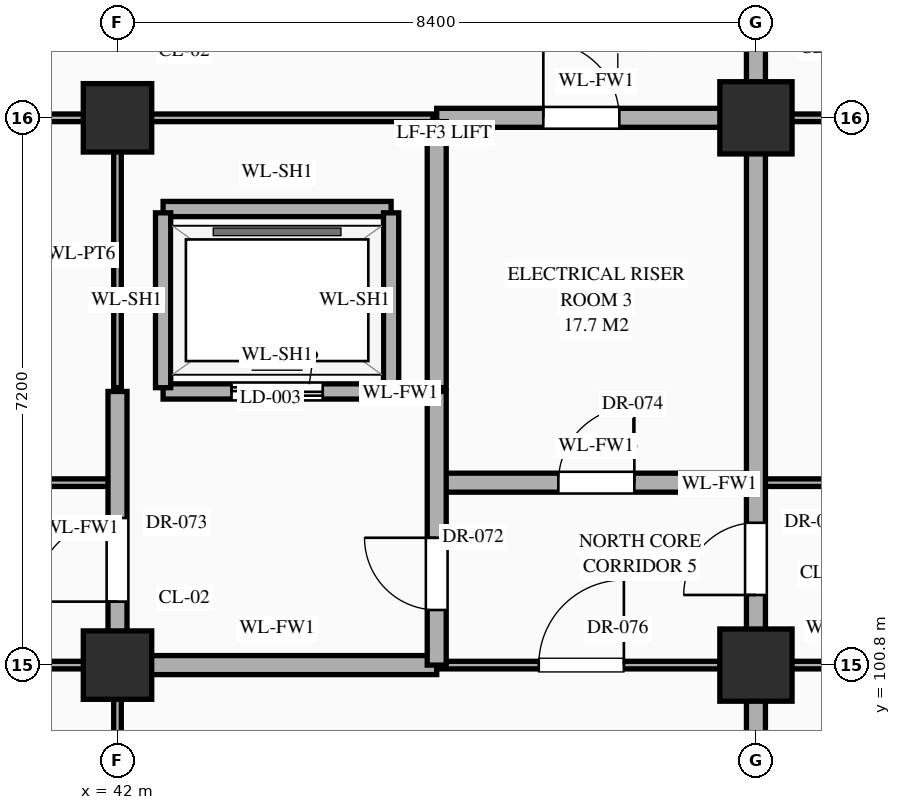
"""IFC4 building model, lengths in metres.
Left out: names, types, materials, properties, quantities, classifications, styles, units other than length and angle.
Written with IfcOpenShell. Run it as: python <this file> out.ifc"""

import sys

from ifc_helpers import new_model, si_unit, direction, frame, frame_2d, origin, origin_2d, place, context, subcontext, project, spatial, rectangle, extrude, element, fill, save


model = new_model("IFC4")
c1 = context("Model", 3, precision=1e-05, world=origin(), true_north=direction((0.0, 1.0)))
c2 = subcontext(c1, "Body", "Model", "MODEL_VIEW")
j1 = project(units=[si_unit("LENGTHUNIT", "METRE"), si_unit("PLANEANGLEUNIT", "RADIAN")], contexts=[c1])
p1 = place(None, origin())
s1 = spatial("IfcSite", under=j1, at=p1, CompositionType="ELEMENT")
p2 = place(p1, origin())
s2 = spatial("IfcBuilding", under=s1, at=p2, CompositionType="ELEMENT")
p3 = place(p2, frame((0.0, 0.0, -10.2)))
s3 = spatial("IfcBuildingStorey", under=s2, at=p3, CompositionType="ELEMENT", Elevation=-10.2)
for number, where, z_axis, x_axis in (
    (1, (42.0, 100.8, 0.0), (0.0, 0.0, 1.0), (1.0, 0.0, 0.0)),
    (2, (42.0, 108.0, 0.0), (0.0, 0.0, 1.0), (1.0, 0.0, 0.0)),
):
    element("IfcColumn", number, at=place(p3, frame(where, z_axis=z_axis, x_axis=x_axis)), inside=s3, PredefinedType="COLUMN", context=c2, shape_type="SweptSolid", body=[
        extrude(rectangle(XDim=0.9, YDim=0.9, at=origin_2d()), origin(), (0.0, 0.0, 1.0), 4.8),
    ])
for number, where, z_axis, x_axis in (
    (3, (50.4, 100.8, 0.0), (0.0, 0.0, 1.0), (1.0, 0.0, 0.0)),
    (4, (50.4, 108.0, 0.0), (0.0, 0.0, 1.0), (1.0, 0.0, 0.0)),
):
    element("IfcColumn", number, at=place(p3, frame(where, z_axis=z_axis, x_axis=x_axis)), inside=s3, PredefinedType="COLUMN", context=c2, shape_type="SweptSolid", body=[
        extrude(rectangle(XDim=0.95, YDim=0.95, at=origin_2d()), origin(), (0.0, 0.0, 1.0), 4.8),
    ])
p4 = place(p3, frame((0.04, 100.8, 0.0), z_axis=(0.0, 0.0, 1.0), x_axis=(1.0, 0.0, 0.0)))
e5 = element("IfcWall", 5, at=p4, inside=s3, PredefinedType="STANDARD", context=c2, shape_type="SweptSolid", body=[
    extrude(rectangle(XDim=41.96, YDim=0.1, at=frame_2d((20.98, 0.0))), origin(), (0.0, 0.0, 1.0), 3.63),
])
p5 = place(p4, frame((1.353, 0.0, 0.0)))
e6 = element("IfcOpeningElement", 6, at=p5, cuts=e5, PredefinedType="OPENING", context=c2, shape_type="SweptSolid", body=[
    extrude(rectangle(XDim=0.96, YDim=2.2, at=frame_2d((0.48, 1.1))), frame((0.0, 0.062, 0.0), z_axis=(0.0, -1.0, 0.0), x_axis=(1.0, 0.0, 0.0)), (0.0, 0.0, 1.0), 0.124),
])
p6 = place(p4, frame((4.06, 0.0, 0.0)))
e7 = element("IfcOpeningElement", 7, at=p6, cuts=e5, PredefinedType="OPENING", context=c2, shape_type="SweptSolid", body=[
    extrude(rectangle(XDim=1.0, YDim=2.25, at=frame_2d((0.5, 1.125))), frame((0.0, 0.062, 0.0), z_axis=(0.0, -1.0, 0.0), x_axis=(1.0, 0.0, 0.0)), (0.0, 0.0, 1.0), 0.124),
])
p7 = place(p4, frame((6.367, 0.0, 0.0)))
e8 = element("IfcOpeningElement", 8, at=p7, cuts=e5, PredefinedType="OPENING", context=c2, shape_type="SweptSolid", body=[
    extrude(rectangle(XDim=1.04, YDim=2.2, at=frame_2d((0.52, 1.1))), frame((0.0, 0.062, 0.0), z_axis=(0.0, -1.0, 0.0), x_axis=(1.0, 0.0, 0.0)), (0.0, 0.0, 1.0), 0.124),
])
p8 = place(p4, frame((12.02, 0.0, 0.0)))
e9 = element("IfcOpeningElement", 9, at=p8, cuts=e5, PredefinedType="OPENING", context=c2, shape_type="SweptSolid", body=[
    extrude(rectangle(XDim=1.08, YDim=2.25, at=frame_2d((0.54, 1.125))), frame((0.0, 0.062, 0.0), z_axis=(0.0, -1.0, 0.0), x_axis=(1.0, 0.0, 0.0)), (0.0, 0.0, 1.0), 0.124),
])
p9 = place(p4, frame((20.387, 0.0, 0.0)))
e10 = element("IfcOpeningElement", 10, at=p9, cuts=e5, PredefinedType="OPENING", context=c2, shape_type="SweptSolid", body=[
    extrude(rectangle(XDim=1.12, YDim=2.25, at=frame_2d((0.56, 1.125))), frame((0.0, 0.062, 0.0), z_axis=(0.0, -1.0, 0.0), x_axis=(1.0, 0.0, 0.0)), (0.0, 0.0, 1.0), 0.124),
])
p10 = place(p4, frame((26.465, 0.0, 0.0)))
e11 = element("IfcOpeningElement", 11, at=p10, cuts=e5, PredefinedType="OPENING", context=c2, shape_type="SweptSolid", body=[
    extrude(rectangle(XDim=1.16, YDim=2.3, at=frame_2d((0.58, 1.15))), frame((0.0, 0.062, 0.0), z_axis=(0.0, -1.0, 0.0), x_axis=(1.0, 0.0, 0.0)), (0.0, 0.0, 1.0), 0.124),
])
p11 = place(p4, frame((29.16, 0.0, 0.0)))
e12 = element("IfcOpeningElement", 12, at=p11, cuts=e5, PredefinedType="OPENING", context=c2, shape_type="SweptSolid", body=[
    extrude(rectangle(XDim=1.2, YDim=2.35, at=frame_2d((0.6, 1.175))), frame((0.0, 0.062, 0.0), z_axis=(0.0, -1.0, 0.0), x_axis=(1.0, 0.0, 0.0)), (0.0, 0.0, 1.0), 0.124),
])
p12 = place(p4, frame((31.455, 0.0, 0.0)))
e13 = element("IfcOpeningElement", 13, at=p12, cuts=e5, PredefinedType="OPENING", context=c2, shape_type="SweptSolid", body=[
    extrude(rectangle(XDim=1.24, YDim=2.3, at=frame_2d((0.62, 1.15))), frame((0.0, 0.062, 0.0), z_axis=(0.0, -1.0, 0.0), x_axis=(1.0, 0.0, 0.0)), (0.0, 0.0, 1.0), 0.124),
])
p13 = place(p4, frame((37.12, 0.0, 0.0)))
e14 = element("IfcOpeningElement", 14, at=p13, cuts=e5, PredefinedType="OPENING", context=c2, shape_type="SweptSolid", body=[
    extrude(rectangle(XDim=1.28, YDim=2.35, at=frame_2d((0.64, 1.175))), frame((0.0, 0.062, 0.0), z_axis=(0.0, -1.0, 0.0), x_axis=(1.0, 0.0, 0.0)), (0.0, 0.0, 1.0), 0.124),
])
p14 = place(p3, frame((42.0, 100.8, 0.0), z_axis=(0.0, 0.0, 1.0), x_axis=(1.0, 0.0, 0.0)))
e15 = element("IfcWall", 15, at=p14, inside=s3, PredefinedType="STANDARD", context=c2, shape_type="SweptSolid", body=[
    extrude(rectangle(XDim=4.2, YDim=0.25, at=frame_2d((2.1, 0.0))), origin(), (0.0, 0.0, 1.0), 3.63),
])
p15 = place(p3, frame((46.2, 100.8, 0.0), z_axis=(0.0, 0.0, 1.0), x_axis=(1.0, 0.0, 0.0)))
e16 = element("IfcWall", 16, at=p15, inside=s3, PredefinedType="STANDARD", context=c2, shape_type="SweptSolid", body=[
    extrude(rectangle(XDim=12.6, YDim=0.1, at=frame_2d((6.3, 0.0))), origin(), (0.0, 0.0, 1.0), 3.63),
])
p16 = place(p15, frame((1.343, 0.0, 0.0)))
e17 = element("IfcOpeningElement", 17, at=p16, cuts=e16, PredefinedType="OPENING", context=c2, shape_type="SweptSolid", body=[
    extrude(rectangle(XDim=1.12, YDim=2.25, at=frame_2d((0.56, 1.125))), frame((0.0, 0.062, 0.0), z_axis=(0.0, -1.0, 0.0), x_axis=(1.0, 0.0, 0.0)), (0.0, 0.0, 1.0), 0.124),
])
p17 = place(p15, frame((5.667, 0.0, 0.0)))
e18 = element("IfcOpeningElement", 18, at=p17, cuts=e16, PredefinedType="OPENING", context=c2, shape_type="SweptSolid", body=[
    extrude(rectangle(XDim=0.86, YDim=2.1, at=frame_2d((0.43, 1.05))), frame((0.0, 0.062, 0.0), z_axis=(0.0, -1.0, 0.0), x_axis=(1.0, 0.0, 0.0)), (0.0, 0.0, 1.0), 0.124),
])
p18 = place(p15, frame((8.34, 0.0, 0.0)))
e19 = element("IfcOpeningElement", 19, at=p18, cuts=e16, PredefinedType="OPENING", context=c2, shape_type="SweptSolid", body=[
    extrude(rectangle(XDim=0.92, YDim=2.15, at=frame_2d((0.46, 1.075))), frame((0.0, 0.062, 0.0), z_axis=(0.0, -1.0, 0.0), x_axis=(1.0, 0.0, 0.0)), (0.0, 0.0, 1.0), 0.124),
])
p19 = place(p15, frame((10.623, 0.0, 0.0)))
e20 = element("IfcOpeningElement", 20, at=p19, cuts=e16, PredefinedType="OPENING", context=c2, shape_type="SweptSolid", body=[
    extrude(rectangle(XDim=0.96, YDim=2.2, at=frame_2d((0.48, 1.1))), frame((0.0, 0.062, 0.0), z_axis=(0.0, -1.0, 0.0), x_axis=(1.0, 0.0, 0.0)), (0.0, 0.0, 1.0), 0.124),
])
p20 = place(p3, frame((0.04, 103.2, 0.0), z_axis=(0.0, 0.0, 1.0), x_axis=(1.0, 0.0, 0.0)))
e21 = element("IfcWall", 21, at=p20, inside=s3, PredefinedType="STANDARD", context=c2, shape_type="SweptSolid", body=[
    extrude(rectangle(XDim=41.96, YDim=0.1, at=frame_2d((20.98, 0.0))), origin(), (0.0, 0.0, 1.0), 4.48),
])
p21 = place(p20, frame((3.65, 0.0, 0.0)))
e22 = element("IfcOpeningElement", 22, at=p21, cuts=e21, PredefinedType="OPENING", context=c2, shape_type="SweptSolid", body=[
    extrude(rectangle(XDim=1.06, YDim=2.4, at=frame_2d((0.53, 1.2))), frame((0.0, 0.062, 0.0), z_axis=(0.0, -1.0, 0.0), x_axis=(1.0, 0.0, 0.0)), (0.0, 0.0, 1.0), 0.124),
])
p22 = place(p20, frame((11.99, 0.0, 0.0)))
e23 = element("IfcOpeningElement", 23, at=p22, cuts=e21, PredefinedType="OPENING", context=c2, shape_type="SweptSolid", body=[
    extrude(rectangle(XDim=1.14, YDim=2.4, at=frame_2d((0.57, 1.2))), frame((0.0, 0.062, 0.0), z_axis=(0.0, -1.0, 0.0), x_axis=(1.0, 0.0, 0.0)), (0.0, 0.0, 1.0), 0.124),
])
p23 = place(p20, frame((20.51, 0.0, 0.0)))
e24 = element("IfcOpeningElement", 24, at=p23, cuts=e21, PredefinedType="OPENING", context=c2, shape_type="SweptSolid", body=[
    extrude(rectangle(XDim=0.9, YDim=2.15, at=frame_2d((0.45, 1.075))), frame((0.0, 0.062, 0.0), z_axis=(0.0, -1.0, 0.0), x_axis=(1.0, 0.0, 0.0)), (0.0, 0.0, 1.0), 0.124),
])
p24 = place(p20, frame((28.93, 0.0, 0.0)))
e25 = element("IfcOpeningElement", 25, at=p24, cuts=e21, PredefinedType="OPENING", context=c2, shape_type="SweptSolid", body=[
    extrude(rectangle(XDim=0.86, YDim=2.1, at=frame_2d((0.43, 1.05))), frame((0.0, 0.062, 0.0), z_axis=(0.0, -1.0, 0.0), x_axis=(1.0, 0.0, 0.0)), (0.0, 0.0, 1.0), 0.124),
])
p25 = place(p20, frame((37.3, 0.0, 0.0)))
e26 = element("IfcOpeningElement", 26, at=p25, cuts=e21, PredefinedType="OPENING", context=c2, shape_type="SweptSolid", body=[
    extrude(rectangle(XDim=0.92, YDim=2.15, at=frame_2d((0.46, 1.075))), frame((0.0, 0.062, 0.0), z_axis=(0.0, -1.0, 0.0), x_axis=(1.0, 0.0, 0.0)), (0.0, 0.0, 1.0), 0.124),
])
p26 = place(p3, frame((46.2, 103.2, 0.0), z_axis=(0.0, 0.0, 1.0), x_axis=(1.0, 0.0, 0.0)))
e27 = element("IfcWall", 27, at=p26, inside=s3, PredefinedType="STANDARD", context=c2, shape_type="SweptSolid", body=[
    extrude(rectangle(XDim=4.2, YDim=0.25, at=frame_2d((2.1, 0.0))), origin(), (0.0, 0.0, 1.0), 4.48),
])
p27 = place(p26, frame((1.6, 0.0, 0.0)))
e28 = element("IfcOpeningElement", 28, at=p27, cuts=e27, PredefinedType="OPENING", context=c2, shape_type="SweptSolid", body=[
    extrude(rectangle(XDim=1.0, YDim=2.2, at=frame_2d((0.5, 1.1))), frame((0.0, 0.137, 0.0), z_axis=(0.0, -1.0, 0.0), x_axis=(1.0, 0.0, 0.0)), (0.0, 0.0, 1.0), 0.274),
])
p28 = place(p3, frame((50.4, 103.2, 0.0), z_axis=(0.0, 0.0, 1.0), x_axis=(1.0, 0.0, 0.0)))
e29 = element("IfcWall", 29, at=p28, inside=s3, PredefinedType="STANDARD", context=c2, shape_type="SweptSolid", body=[
    extrude(rectangle(XDim=8.4, YDim=0.1, at=frame_2d((4.2, 0.0))), origin(), (0.0, 0.0, 1.0), 4.48),
])
p29 = place(p28, frame((3.75, 0.0, 0.0)))
e30 = element("IfcOpeningElement", 30, at=p29, cuts=e29, PredefinedType="OPENING", context=c2, shape_type="SweptSolid", body=[
    extrude(rectangle(XDim=0.9, YDim=2.15, at=frame_2d((0.45, 1.075))), frame((0.0, 0.062, 0.0), z_axis=(0.0, -1.0, 0.0), x_axis=(1.0, 0.0, 0.0)), (0.0, 0.0, 1.0), 0.124),
])
p30 = place(p3, frame((42.6, 104.4, 0.0), z_axis=(0.0, 0.0, 1.0), x_axis=(1.0, 0.0, 0.0)))
e31 = element("IfcWall", 31, at=p30, inside=s3, PredefinedType="STANDARD", context=c2, shape_type="SweptSolid", body=[
    extrude(rectangle(XDim=3.0, YDim=0.2, at=frame_2d((1.5, 0.0))), origin(), (0.0, 0.0, 1.0), 4.48),
])
p31 = place(p30, frame((0.9, 0.0, 0.0)))
e32 = element("IfcOpeningElement", 32, at=p31, cuts=e31, PredefinedType="OPENING", context=c2, shape_type="SweptSolid", body=[
    extrude(rectangle(XDim=1.2, YDim=2.15, at=frame_2d((0.6, 1.075))), frame((0.0, 0.112, 0.0), z_axis=(0.0, -1.0, 0.0), x_axis=(1.0, 0.0, 0.0)), (0.0, 0.0, 1.0), 0.224),
])
p32 = place(p3, frame((42.6, 106.8, 0.0), z_axis=(0.0, 0.0, 1.0), x_axis=(1.0, 0.0, 0.0)))
e33 = element("IfcWall", 33, at=p32, inside=s3, PredefinedType="STANDARD", context=c2, shape_type="SweptSolid", body=[
    extrude(rectangle(XDim=3.0, YDim=0.2, at=frame_2d((1.5, 0.0))), origin(), (0.0, 0.0, 1.0), 4.48),
])
p33 = place(p3, frame((0.04, 108.0, 0.0), z_axis=(0.0, 0.0, 1.0), x_axis=(1.0, 0.0, 0.0)))
e34 = element("IfcWall", 34, at=p33, inside=s3, PredefinedType="STANDARD", context=c2, shape_type="SweptSolid", body=[
    extrude(rectangle(XDim=41.96, YDim=0.1, at=frame_2d((20.98, 0.0))), origin(), (0.0, 0.0, 1.0), 3.63),
])
p34 = place(p33, frame((3.69, 0.0, 0.0)))
e35 = element("IfcOpeningElement", 35, at=p34, cuts=e34, PredefinedType="OPENING", context=c2, shape_type="SweptSolid", body=[
    extrude(rectangle(XDim=0.94, YDim=2.3, at=frame_2d((0.47, 1.15))), frame((0.0, 0.062, 0.0), z_axis=(0.0, -1.0, 0.0), x_axis=(1.0, 0.0, 0.0)), (0.0, 0.0, 1.0), 0.124),
])
p35 = place(p33, frame((12.07, 0.0, 0.0)))
e36 = element("IfcOpeningElement", 36, at=p35, cuts=e34, PredefinedType="OPENING", context=c2, shape_type="SweptSolid", body=[
    extrude(rectangle(XDim=0.98, YDim=2.35, at=frame_2d((0.49, 1.175))), frame((0.0, 0.062, 0.0), z_axis=(0.0, -1.0, 0.0), x_axis=(1.0, 0.0, 0.0)), (0.0, 0.0, 1.0), 0.124),
])
p36 = place(p33, frame((20.438, 0.0, 0.0)))
e37 = element("IfcOpeningElement", 37, at=p36, cuts=e34, PredefinedType="OPENING", context=c2, shape_type="SweptSolid", body=[
    extrude(rectangle(XDim=1.02, YDim=2.4, at=frame_2d((0.51, 1.2))), frame((0.0, 0.062, 0.0), z_axis=(0.0, -1.0, 0.0), x_axis=(1.0, 0.0, 0.0)), (0.0, 0.0, 1.0), 0.124),
])
p37 = place(p33, frame((28.83, 0.0, 0.0)))
e38 = element("IfcOpeningElement", 38, at=p37, cuts=e34, PredefinedType="OPENING", context=c2, shape_type="SweptSolid", body=[
    extrude(rectangle(XDim=1.06, YDim=2.4, at=frame_2d((0.53, 1.2))), frame((0.0, 0.062, 0.0), z_axis=(0.0, -1.0, 0.0), x_axis=(1.0, 0.0, 0.0)), (0.0, 0.0, 1.0), 0.124),
])
p38 = place(p33, frame((37.19, 0.0, 0.0)))
e39 = element("IfcOpeningElement", 39, at=p38, cuts=e34, PredefinedType="OPENING", context=c2, shape_type="SweptSolid", body=[
    extrude(rectangle(XDim=1.14, YDim=2.4, at=frame_2d((0.57, 1.2))), frame((0.0, 0.062, 0.0), z_axis=(0.0, -1.0, 0.0), x_axis=(1.0, 0.0, 0.0)), (0.0, 0.0, 1.0), 0.124),
])
p39 = place(p3, frame((42.05, 108.0, 0.0), z_axis=(0.0, 0.0, 1.0), x_axis=(1.0, 0.0, 0.0)))
e40 = element("IfcWall", 40, at=p39, inside=s3, PredefinedType="STANDARD", context=c2, shape_type="SweptSolid", body=[
    extrude(rectangle(XDim=4.1, YDim=0.1, at=frame_2d((2.05, 0.0))), origin(), (0.0, 0.0, 1.0), 3.63),
])
p40 = place(p3, frame((46.2, 108.0, 0.0), z_axis=(0.0, 0.0, 1.0), x_axis=(1.0, 0.0, 0.0)))
e41 = element("IfcWall", 41, at=p40, inside=s3, PredefinedType="STANDARD", context=c2, shape_type="SweptSolid", body=[
    extrude(rectangle(XDim=4.2, YDim=0.25, at=frame_2d((2.1, 0.0))), origin(), (0.0, 0.0, 1.0), 3.63),
])
p41 = place(p40, frame((1.403, 0.0, 0.0)))
e42 = element("IfcOpeningElement", 42, at=p41, cuts=e41, PredefinedType="OPENING", context=c2, shape_type="SweptSolid", body=[
    extrude(rectangle(XDim=1.0, YDim=2.2, at=frame_2d((0.5, 1.1))), frame((0.0, 0.137, 0.0), z_axis=(0.0, -1.0, 0.0), x_axis=(1.0, 0.0, 0.0)), (0.0, 0.0, 1.0), 0.274),
])
p42 = place(p3, frame((50.4, 108.0, 0.0), z_axis=(0.0, 0.0, 1.0), x_axis=(1.0, 0.0, 0.0)))
e43 = element("IfcWall", 43, at=p42, inside=s3, PredefinedType="STANDARD", context=c2, shape_type="SweptSolid", body=[
    extrude(rectangle(XDim=8.4, YDim=0.1, at=frame_2d((4.2, 0.0))), origin(), (0.0, 0.0, 1.0), 3.63),
])
p43 = place(p42, frame((3.7, 0.0, 0.0)))
e44 = element("IfcOpeningElement", 44, at=p43, cuts=e43, PredefinedType="OPENING", context=c2, shape_type="SweptSolid", body=[
    extrude(rectangle(XDim=1.0, YDim=2.25, at=frame_2d((0.5, 1.125))), frame((0.0, 0.062, 0.0), z_axis=(0.0, -1.0, 0.0), x_axis=(1.0, 0.0, 0.0)), (0.0, 0.0, 1.0), 0.124),
])
p44 = place(p3, frame((42.0, 96.0, 0.0), z_axis=(0.0, 0.0, 1.0), x_axis=(0.0, 1.0, 0.0)))
e45 = element("IfcWall", 45, at=p44, inside=s3, PredefinedType="STANDARD", context=c2, shape_type="SweptSolid", body=[
    extrude(rectangle(XDim=4.8, YDim=0.1, at=frame_2d((2.4, 0.0))), origin(), (0.0, 0.0, 1.0), 3.73),
])
p45 = place(p3, frame((42.0, 100.8, 0.0), z_axis=(0.0, 0.0, 1.0), x_axis=(0.0, 1.0, 0.0)))
e46 = element("IfcWall", 46, at=p45, inside=s3, PredefinedType="STANDARD", context=c2, shape_type="SweptSolid", body=[
    extrude(rectangle(XDim=3.6, YDim=0.25, at=frame_2d((1.8, 0.0))), origin(), (0.0, 0.0, 1.0), 3.73),
])
p46 = place(p45, frame((0.835, 0.0, 0.0)))
e47 = element("IfcOpeningElement", 47, at=p46, cuts=e46, PredefinedType="OPENING", context=c2, shape_type="SweptSolid", body=[
    extrude(rectangle(XDim=1.1, YDim=2.2, at=frame_2d((0.55, 1.1))), frame((0.0, 0.137, 0.0), z_axis=(0.0, -1.0, 0.0), x_axis=(1.0, 0.0, 0.0)), (0.0, 0.0, 1.0), 0.274),
])
p47 = place(p3, frame((42.0, 104.45, 0.0), z_axis=(0.0, 0.0, 1.0), x_axis=(0.0, 1.0, 0.0)))
e48 = element("IfcWall", 48, at=p47, inside=s3, PredefinedType="STANDARD", context=c2, shape_type="SweptSolid", body=[
    extrude(rectangle(XDim=3.5, YDim=0.1, at=frame_2d((1.75, 0.0))), origin(), (0.0, 0.0, 1.0), 3.73),
])
for number, where, z_axis, x_axis in (
    (49, (42.6, 104.45, 0.0), (0.0, 0.0, 1.0), (0.0, 1.0, 0.0)),
    (50, (45.6, 104.45, 0.0), (0.0, 0.0, 1.0), (0.0, 1.0, 0.0)),
):
    element("IfcWall", number, at=place(p3, frame(where, z_axis=z_axis, x_axis=x_axis)), inside=s3, PredefinedType="STANDARD", context=c2, shape_type="SweptSolid", body=[
        extrude(rectangle(XDim=2.3, YDim=0.2, at=frame_2d((1.15, 0.0))), origin(), (0.0, 0.0, 1.0), 4.48),
    ])
p48 = place(p3, frame((46.2, 100.8, 0.0), z_axis=(0.0, 0.0, 1.0), x_axis=(0.0, 1.0, 0.0)))
e51 = element("IfcWall", 51, at=p48, inside=s3, PredefinedType="STANDARD", context=c2, shape_type="SweptSolid", body=[
    extrude(rectangle(XDim=3.6, YDim=0.25, at=frame_2d((1.8, 0.0))), origin(), (0.0, 0.0, 1.0), 4.48),
])
p49 = place(p48, frame((0.725, 0.0, 0.0)))
e52 = element("IfcOpeningElement", 52, at=p49, cuts=e51, PredefinedType="OPENING", context=c2, shape_type="SweptSolid", body=[
    extrude(rectangle(XDim=0.95, YDim=2.15, at=frame_2d((0.475, 1.075))), frame((0.0, 0.137, 0.0), z_axis=(0.0, -1.0, 0.0), x_axis=(1.0, 0.0, 0.0)), (0.0, 0.0, 1.0), 0.274),
])
p50 = place(p3, frame((46.2, 104.45, 0.0), z_axis=(0.0, 0.0, 1.0), x_axis=(0.0, 1.0, 0.0)))
e53 = element("IfcWall", 53, at=p50, inside=s3, PredefinedType="STANDARD", context=c2, shape_type="SweptSolid", body=[
    extrude(rectangle(XDim=3.5, YDim=0.25, at=frame_2d((1.75, 0.0))), origin(), (0.0, 0.0, 1.0), 4.48),
])
p51 = place(p3, frame((50.4, 91.2, 0.0), z_axis=(0.0, 0.0, 1.0), x_axis=(0.0, 1.0, 0.0)))
e54 = element("IfcWall", 54, at=p51, inside=s3, PredefinedType="STANDARD", context=c2, shape_type="SweptSolid", body=[
    extrude(rectangle(XDim=23.96, YDim=0.25, at=frame_2d((11.98, 0.0))), origin(), (0.0, 0.0, 1.0), 3.73),
])
p52 = place(p51, frame((0.502, 0.0, 0.0)))
e55 = element("IfcOpeningElement", 55, at=p52, cuts=e54, PredefinedType="OPENING", context=c2, shape_type="SweptSolid", body=[
    extrude(rectangle(XDim=1.0, YDim=2.2, at=frame_2d((0.5, 1.1))), frame((0.0, 0.137, 0.0), z_axis=(0.0, -1.0, 0.0), x_axis=(1.0, 0.0, 0.0)), (0.0, 0.0, 1.0), 0.274),
])
p53 = place(p51, frame((10.522, 0.0, 0.0)))
e56 = element("IfcOpeningElement", 56, at=p53, cuts=e54, PredefinedType="OPENING", context=c2, shape_type="SweptSolid", body=[
    extrude(rectangle(XDim=0.95, YDim=2.15, at=frame_2d((0.475, 1.075))), frame((0.0, 0.137, 0.0), z_axis=(0.0, -1.0, 0.0), x_axis=(1.0, 0.0, 0.0)), (0.0, 0.0, 1.0), 0.274),
])
p54 = place(p51, frame((3.323, 0.0, 0.0)))
e57 = element("IfcOpeningElement", 57, at=p54, cuts=e54, PredefinedType="OPENING", context=c2, shape_type="SweptSolid", body=[
    extrude(rectangle(XDim=0.95, YDim=2.15, at=frame_2d((0.475, 1.075))), frame((0.0, 0.137, 0.0), z_axis=(0.0, -1.0, 0.0), x_axis=(1.0, 0.0, 0.0)), (0.0, 0.0, 1.0), 0.274),
])
p55 = place(p51, frame((17.698, 0.0, 0.0)))
e58 = element("IfcOpeningElement", 58, at=p55, cuts=e54, PredefinedType="OPENING", context=c2, shape_type="SweptSolid", body=[
    extrude(rectangle(XDim=1.0, YDim=2.2, at=frame_2d((0.5, 1.1))), frame((0.0, 0.137, 0.0), z_axis=(0.0, -1.0, 0.0), x_axis=(1.0, 0.0, 0.0)), (0.0, 0.0, 1.0), 0.274),
])
p56 = place(p31, origin())
e59 = element("IfcDoor", 59, at=p56, inside=s3, OperationType="DOUBLE_DOOR_SLIDING", PredefinedType="DOOR", context=c2, shape_type="SweptSolid", body=[
    extrude(rectangle(XDim=1.2, YDim=2.15, at=frame_2d((0.6, 1.075))), frame((0.0, 0.025, 0.0), z_axis=(0.0, -1.0, 0.0), x_axis=(1.0, 0.0, 0.0)), (0.0, 0.0, 1.0), 0.05),
])
fill(e32, e59)
p57 = place(p49, origin())
e60 = element("IfcDoor", 60, at=p57, inside=s3, OperationType="SINGLE_SWING_RIGHT", PredefinedType="DOOR", context=c2, shape_type="SweptSolid", body=[
    extrude(rectangle(XDim=0.95, YDim=2.15, at=frame_2d((0.475, 1.075))), frame((0.0, 0.025, 0.0), z_axis=(0.0, -1.0, 0.0), x_axis=(1.0, 0.0, 0.0)), (0.0, 0.0, 1.0), 0.05),
])
fill(e52, e60)
p58 = place(p46, origin())
e61 = element("IfcDoor", 61, at=p58, inside=s3, OperationType="SINGLE_SWING_LEFT", PredefinedType="DOOR", context=c2, shape_type="SweptSolid", body=[
    extrude(rectangle(XDim=1.1, YDim=2.2, at=frame_2d((0.55, 1.1))), frame((0.0, 0.025, 0.0), z_axis=(0.0, -1.0, 0.0), x_axis=(1.0, 0.0, 0.0)), (0.0, 0.0, 1.0), 0.05),
])
fill(e47, e61)
p59 = place(p27, origin())
e62 = element("IfcDoor", 62, at=p59, inside=s3, OperationType="SINGLE_SWING_RIGHT", PredefinedType="DOOR", context=c2, shape_type="SweptSolid", body=[
    extrude(rectangle(XDim=1.0, YDim=2.2, at=frame_2d((0.5, 1.1))), frame((0.0, 0.025, 0.0), z_axis=(0.0, -1.0, 0.0), x_axis=(1.0, 0.0, 0.0)), (0.0, 0.0, 1.0), 0.05),
])
fill(e28, e62)
p60 = place(p53, origin())
e63 = element("IfcDoor", 63, at=p60, inside=s3, OperationType="SINGLE_SWING_LEFT", PredefinedType="DOOR", context=c2, shape_type="SweptSolid", body=[
    extrude(rectangle(XDim=0.95, YDim=2.15, at=frame_2d((0.475, 1.075))), frame((0.0, 0.025, 0.0), z_axis=(0.0, -1.0, 0.0), x_axis=(1.0, 0.0, 0.0)), (0.0, 0.0, 1.0), 0.05),
])
fill(e56, e63)
p61 = place(p16, origin())
e64 = element("IfcDoor", 64, at=p61, inside=s3, OperationType="SINGLE_SWING_RIGHT", PredefinedType="DOOR", context=c2, shape_type="SweptSolid", body=[
    extrude(rectangle(XDim=1.12, YDim=2.25, at=frame_2d((0.56, 1.125))), frame((0.0, 0.025, 0.0), z_axis=(0.0, -1.0, 0.0), x_axis=(1.0, 0.0, 0.0)), (0.0, 0.0, 1.0), 0.05),
])
fill(e17, e64)
p62 = place(p41, origin())
e65 = element("IfcDoor", 65, at=p62, inside=s3, OperationType="SINGLE_SWING_LEFT", PredefinedType="DOOR", context=c2, shape_type="SweptSolid", body=[
    extrude(rectangle(XDim=1.0, YDim=2.2, at=frame_2d((0.5, 1.1))), frame((0.0, 0.025, 0.0), z_axis=(0.0, -1.0, 0.0), x_axis=(1.0, 0.0, 0.0)), (0.0, 0.0, 1.0), 0.05),
])
fill(e42, e65)
save(model, sys.argv[1])
